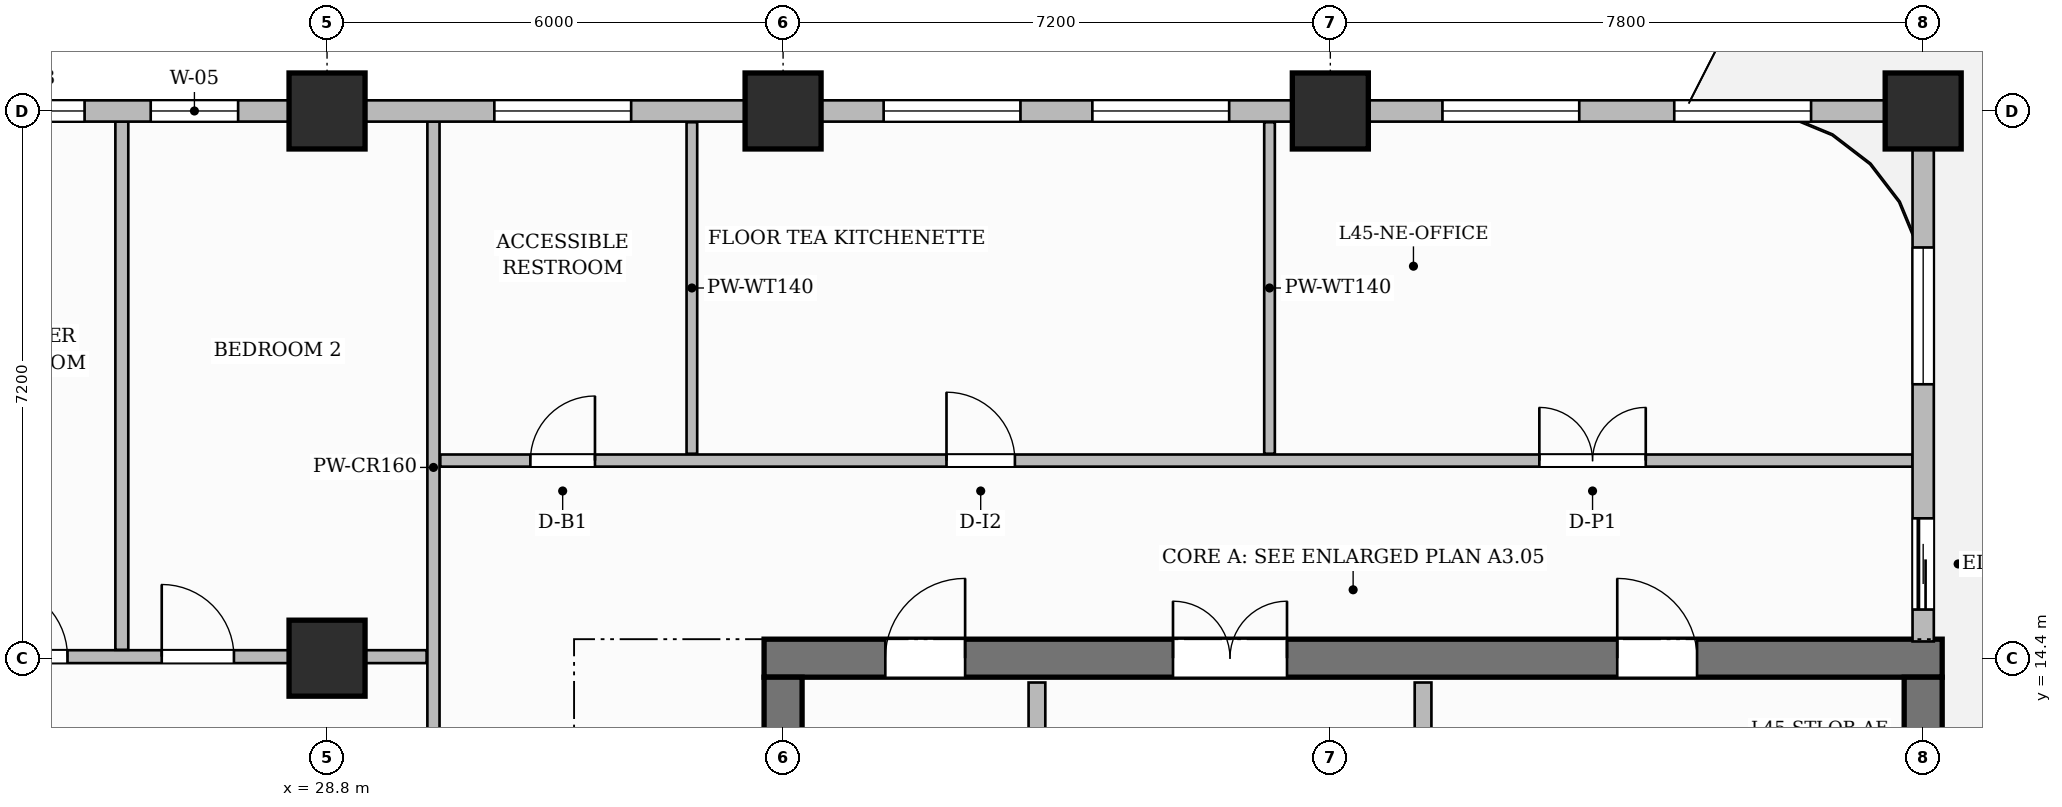
"""IFC4 building model, lengths in metres.
Left out: names, types, materials, properties, quantities, classifications, styles, units other than length and angle.
Written with IfcOpenShell. Run it as: python <this file> out.ifc"""

import sys

from ifc_helpers import new_model, si_unit, direction, frame, frame_2d, origin, origin_2d, place, context, subcontext, project, spatial, rectangle, extrude, source, transform, mapped, element, fill, save


model = new_model("IFC4")
c1 = context("Model", 3, precision=1e-05, world=origin(), true_north=direction((0.0, 1.0)))
c2 = subcontext(c1, "Body", "Model", "MODEL_VIEW")
j1 = project(units=[si_unit("LENGTHUNIT", "METRE"), si_unit("PLANEANGLEUNIT", "RADIAN")], contexts=[c1])
p1 = place(None, origin())
s1 = spatial("IfcSite", under=j1, at=p1, CompositionType="ELEMENT")
p2 = place(p1, origin())
s2 = spatial("IfcBuilding", under=s1, at=p2, CompositionType="ELEMENT")
p3 = place(p2, frame((0.0, 0.0, 181.1)))
s3 = spatial("IfcBuildingStorey", under=s2, at=p3, CompositionType="ELEMENT", Elevation=181.1)
p4 = place(p3, frame((34.55, 14.4, 0.0), z_axis=(0.0, 0.0, 1.0), x_axis=(1.0, 0.0, 0.0)))
e1 = element("IfcWall", 1, at=p4, inside=s3, PredefinedType="SHEAR", context=c2, shape_type="SweptSolid", body=[
    extrude(rectangle(XDim=15.5, YDim=0.5, at=frame_2d((7.75, 0.0))), origin(), (0.0, 0.0, 1.0), 3.85),
])
p5 = place(p4, frame((5.38, 0.0, 0.0)))
e2 = element("IfcOpeningElement", 2, at=p5, cuts=e1, PredefinedType="OPENING", context=c2, shape_type="SweptSolid", body=[
    extrude(rectangle(XDim=1.5, YDim=2.2, at=frame_2d((0.75, 1.1))), frame((0.0, 0.26, 0.0), z_axis=(0.0, -1.0, 0.0), x_axis=(1.0, 0.0, 0.0)), (0.0, 0.0, 1.0), 0.52),
])
p6 = place(p4, frame((1.595, 0.0, 0.0)))
e3 = element("IfcOpeningElement", 3, at=p6, cuts=e1, PredefinedType="OPENING", context=c2, shape_type="SweptSolid", body=[
    extrude(rectangle(XDim=1.05, YDim=2.15, at=frame_2d((0.525, 1.075))), frame((0.0, 0.26, 0.0), z_axis=(0.0, -1.0, 0.0), x_axis=(1.0, 0.0, 0.0)), (0.0, 0.0, 1.0), 0.52),
])
p7 = place(p4, frame((11.225, 0.0, 0.0)))
e4 = element("IfcOpeningElement", 4, at=p7, cuts=e1, PredefinedType="OPENING", context=c2, shape_type="SweptSolid", body=[
    extrude(rectangle(XDim=1.05, YDim=2.15, at=frame_2d((0.525, 1.075))), frame((0.0, 0.26, 0.0), z_axis=(0.0, -1.0, 0.0), x_axis=(1.0, 0.0, 0.0)), (0.0, 0.0, 1.0), 0.52),
])
for number, where, z_axis, x_axis in (
    (5, (34.8, 3.85, 0.0), (0.0, 0.0, 1.0), (0.0, 1.0, 0.0)),
    (6, (49.8, 3.85, 0.0), (0.0, 0.0, 1.0), (0.0, 1.0, 0.0)),
):
    element("IfcWall", number, at=place(p3, frame(where, z_axis=z_axis, x_axis=x_axis)), inside=s3, PredefinedType="SHEAR", context=c2, shape_type="SweptSolid", body=[
        extrude(rectangle(XDim=10.3, YDim=0.5, at=frame_2d((5.15, 0.0))), origin(), (0.0, 0.0, 1.0), 3.85),
    ])
m1 = source(origin(), c2, "Body", "SweptSolid", [
    extrude(rectangle(XDim=1.0, YDim=1.0, at=origin_2d()), origin(), (0.0, 0.0, 1.0), 3.85),
])
for number, where, z_axis, x_axis in (
    (7, (28.8, 14.4, 0.0), (0.0, 0.0, 1.0), (1.0, 0.0, 0.0)),
    (8, (28.8, 21.6, 0.0), (0.0, 0.0, 1.0), (1.0, 0.0, 0.0)),
    (9, (34.8, 21.6, 0.0), (0.0, 0.0, 1.0), (1.0, 0.0, 0.0)),
    (10, (42.0, 21.6, 0.0), (0.0, 0.0, 1.0), (1.0, 0.0, 0.0)),
    (11, (49.8, 21.6, 0.0), (0.0, 0.0, 1.0), (1.0, 0.0, 0.0)),
):
    element("IfcColumn", number, at=place(p3, frame(where, z_axis=z_axis, x_axis=x_axis)), inside=s3, PredefinedType="COLUMN", context=c2, shape_type="MappedRepresentation", body=[
        mapped(m1, transform((0.0, 0.0, 0.0), scale=1.0)),
    ])
p8 = place(p3, frame((38.14, 11.22, 0.0), z_axis=(0.0, 0.0, 1.0), x_axis=(0.0, 1.0, 0.0)))
e12 = element("IfcWall", 12, at=p8, inside=s3, PredefinedType="PARTITIONING", context=c2, shape_type="SweptSolid", body=[
    extrude(rectangle(XDim=2.86, YDim=0.22, at=frame_2d((1.43, 0.0))), origin(), (0.0, 0.0, 1.0), 3.6),
])
p9 = place(p8, frame((0.905, 0.0, 0.0)))
e13 = element("IfcOpeningElement", 13, at=p9, cuts=e12, PredefinedType="OPENING", context=c2, shape_type="SweptSolid", body=[
    extrude(rectangle(XDim=1.05, YDim=2.15, at=frame_2d((0.525, 1.075))), frame((0.0, 0.12, 0.0), z_axis=(0.0, -1.0, 0.0), x_axis=(1.0, 0.0, 0.0)), (0.0, 0.0, 1.0), 0.24),
])
p10 = place(p3, frame((43.22, 11.22, 0.0), z_axis=(0.0, 0.0, 1.0), x_axis=(0.0, 1.0, 0.0)))
e14 = element("IfcWall", 14, at=p10, inside=s3, PredefinedType="PARTITIONING", context=c2, shape_type="SweptSolid", body=[
    extrude(rectangle(XDim=2.86, YDim=0.22, at=frame_2d((1.43, 0.0))), origin(), (0.0, 0.0, 1.0), 3.6),
])
p11 = place(p10, frame((0.905, 0.0, 0.0)))
e15 = element("IfcOpeningElement", 15, at=p11, cuts=e14, PredefinedType="OPENING", context=c2, shape_type="SweptSolid", body=[
    extrude(rectangle(XDim=1.05, YDim=2.15, at=frame_2d((0.525, 1.075))), frame((0.0, 0.12, 0.0), z_axis=(0.0, -1.0, 0.0), x_axis=(1.0, 0.0, 0.0)), (0.0, 0.0, 1.0), 0.24),
])
p12 = place(p3, frame((30.2, 12.36, 0.0), z_axis=(0.0, 0.0, 1.0), x_axis=(0.0, 1.0, 0.0)))
e16 = element("IfcWall", 16, at=p12, inside=s3, PredefinedType="PARTITIONING", context=c2, shape_type="SweptSolid", body=[
    extrude(rectangle(XDim=9.1, YDim=0.16, at=frame_2d((4.55, 0.0))), origin(), (0.0, 0.0, 1.0), 3.6),
])
p13 = place(p3, frame((30.29, 17.0, 0.0), z_axis=(0.0, 0.0, 1.0), x_axis=(1.0, 0.0, 0.0)))
e17 = element("IfcWall", 17, at=p13, inside=s3, PredefinedType="PARTITIONING", context=c2, shape_type="SweptSolid", body=[
    extrude(rectangle(XDim=19.37, YDim=0.16, at=frame_2d((9.685, 0.0))), origin(), (0.0, 0.0, 1.0), 3.6),
])
p14 = place(p13, frame((1.185, 0.0, 0.0)))
e18 = element("IfcOpeningElement", 18, at=p14, cuts=e17, PredefinedType="OPENING", context=c2, shape_type="SweptSolid", body=[
    extrude(rectangle(XDim=0.85, YDim=2.1, at=frame_2d((0.425, 1.05))), frame((0.0, 0.09, 0.0), z_axis=(0.0, -1.0, 0.0), x_axis=(1.0, 0.0, 0.0)), (0.0, 0.0, 1.0), 0.18),
])
p15 = place(p13, frame((6.66, 0.0, 0.0)))
e19 = element("IfcOpeningElement", 19, at=p15, cuts=e17, PredefinedType="OPENING", context=c2, shape_type="SweptSolid", body=[
    extrude(rectangle(XDim=0.9, YDim=2.15, at=frame_2d((0.45, 1.075))), frame((0.0, 0.09, 0.0), z_axis=(0.0, -1.0, 0.0), x_axis=(1.0, 0.0, 0.0)), (0.0, 0.0, 1.0), 0.18),
])
p16 = place(p13, frame((14.46, 0.0, 0.0)))
e20 = element("IfcOpeningElement", 20, at=p16, cuts=e17, PredefinedType="OPENING", context=c2, shape_type="SweptSolid", body=[
    extrude(rectangle(XDim=1.4, YDim=2.35, at=frame_2d((0.7, 1.175))), frame((0.0, 0.09, 0.0), z_axis=(0.0, -1.0, 0.0), x_axis=(1.0, 0.0, 0.0)), (0.0, 0.0, 1.0), 0.18),
])
for number, where, z_axis, x_axis in (
    (21, (33.6, 17.09, 0.0), (0.0, 0.0, 1.0), (0.0, 1.0, 0.0)),
    (22, (41.2, 17.09, 0.0), (0.0, 0.0, 1.0), (0.0, 1.0, 0.0)),
):
    element("IfcWall", number, at=place(p3, frame(where, z_axis=z_axis, x_axis=x_axis)), inside=s3, PredefinedType="PARTITIONING", context=c2, shape_type="SweptSolid", body=[
        extrude(rectangle(XDim=4.362, YDim=0.14, at=frame_2d((2.181, 0.0))), origin(), (0.0, 0.0, 1.0), 3.6),
    ])
p17 = place(p3, frame((23.81, 14.42, 0.0), z_axis=(0.0, 0.0, 1.0), x_axis=(1.0, 0.0, 0.0)))
e23 = element("IfcWall", 23, at=p17, inside=s3, PredefinedType="PARTITIONING", context=c2, shape_type="SweptSolid", body=[
    extrude(rectangle(XDim=6.3, YDim=0.17, at=frame_2d((3.15, 0.0))), origin(), (0.0, 0.0, 1.0), 2.985),
])
p18 = place(p17, frame((0.625, 0.0, 0.0)))
e24 = element("IfcOpeningElement", 24, at=p18, cuts=e23, PredefinedType="OPENING", context=c2, shape_type="SweptSolid", body=[
    extrude(rectangle(XDim=0.95, YDim=2.15, at=frame_2d((0.475, 1.075))), frame((0.0, 0.095, 0.0), z_axis=(0.0, -1.0, 0.0), x_axis=(1.0, 0.0, 0.0)), (0.0, 0.0, 1.0), 0.19),
])
p19 = place(p17, frame((2.815, 0.0, 0.0)))
e25 = element("IfcOpeningElement", 25, at=p19, cuts=e23, PredefinedType="OPENING", context=c2, shape_type="SweptSolid", body=[
    extrude(rectangle(XDim=0.95, YDim=2.15, at=frame_2d((0.475, 1.075))), frame((0.0, 0.095, 0.0), z_axis=(0.0, -1.0, 0.0), x_axis=(1.0, 0.0, 0.0)), (0.0, 0.0, 1.0), 0.19),
])
p20 = place(p3, frame((26.1, 14.51, 0.0), z_axis=(0.0, 0.0, 1.0), x_axis=(0.0, 1.0, 0.0)))
e26 = element("IfcWall", 26, at=p20, inside=s3, PredefinedType="PARTITIONING", context=c2, shape_type="SweptSolid", body=[
    extrude(rectangle(XDim=6.95, YDim=0.17, at=frame_2d((3.475, 0.0))), origin(), (0.0, 0.0, 1.0), 3.6),
])
p21 = place(p3, frame((49.8, 14.62, 0.0), z_axis=(0.0, 0.0, 1.0), x_axis=(0.0, 1.0, 0.0)))
e27 = element("IfcWall", 27, at=p21, inside=s3, PredefinedType="SOLIDWALL", context=c2, shape_type="SweptSolid", body=[
    extrude(rectangle(XDim=6.93, YDim=0.28, at=frame_2d((3.465, 0.0))), origin(), (0.0, 0.0, 1.0), 3.085),
])
p22 = place(p21, frame((0.42, 0.0, 0.0)))
e28 = element("IfcOpeningElement", 28, at=p22, cuts=e27, PredefinedType="OPENING", context=c2, shape_type="SweptSolid", body=[
    extrude(rectangle(XDim=1.2, YDim=2.2, at=frame_2d((0.6, 1.1))), frame((0.0, 0.15, 0.0), z_axis=(0.0, -1.0, 0.0), x_axis=(1.0, 0.0, 0.0)), (0.0, 0.0, 1.0), 0.3),
])
p23 = place(p21, frame((3.384, 0.0, 0.8)))
e29 = element("IfcOpeningElement", 29, at=p23, cuts=e27, PredefinedType="OPENING", context=c2, shape_type="SweptSolid", body=[
    extrude(rectangle(XDim=1.8, YDim=1.85, at=frame_2d((0.9, 0.925))), frame((0.0, 0.15, 0.0), z_axis=(0.0, -1.0, 0.0), x_axis=(1.0, 0.0, 0.0)), (0.0, 0.0, 1.0), 0.3),
])
p24 = place(p3, frame((18.0, 21.6, 0.0), z_axis=(0.0, 0.0, 1.0), x_axis=(1.0, 0.0, 0.0)))
e30 = element("IfcWall", 30, at=p24, inside=s3, PredefinedType="SOLIDWALL", context=c2, shape_type="SweptSolid", body=[
    extrude(rectangle(XDim=31.8, YDim=0.28, at=frame_2d((15.9, 0.0))), origin(), (0.0, 0.0, 1.0), 3.085),
])
p25 = place(p24, frame((0.885, 0.0, 0.8)))
e31 = element("IfcOpeningElement", 31, at=p25, cuts=e30, PredefinedType="OPENING", context=c2, shape_type="SweptSolid", body=[
    extrude(rectangle(XDim=1.4, YDim=1.85, at=frame_2d((0.7, 0.925))), frame((0.0, 0.15, 0.0), z_axis=(0.0, -1.0, 0.0), x_axis=(1.0, 0.0, 0.0)), (0.0, 0.0, 1.0), 0.3),
])
p26 = place(p24, frame((4.581, 0.0, 0.8)))
e32 = element("IfcOpeningElement", 32, at=p26, cuts=e30, PredefinedType="OPENING", context=c2, shape_type="SweptSolid", body=[
    extrude(rectangle(XDim=0.95, YDim=1.75, at=frame_2d((0.475, 0.875))), frame((0.0, 0.15, 0.0), z_axis=(0.0, -1.0, 0.0), x_axis=(1.0, 0.0, 0.0)), (0.0, 0.0, 1.0), 0.3),
])
p27 = place(p24, frame((6.21, 0.0, 0.8)))
e33 = element("IfcOpeningElement", 33, at=p27, cuts=e30, PredefinedType="OPENING", context=c2, shape_type="SweptSolid", body=[
    extrude(rectangle(XDim=1.4, YDim=1.85, at=frame_2d((0.7, 0.925))), frame((0.0, 0.15, 0.0), z_axis=(0.0, -1.0, 0.0), x_axis=(1.0, 0.0, 0.0)), (0.0, 0.0, 1.0), 0.3),
])
p28 = place(p24, frame((8.48, 0.0, 0.8)))
e34 = element("IfcOpeningElement", 34, at=p28, cuts=e30, PredefinedType="OPENING", context=c2, shape_type="SweptSolid", body=[
    extrude(rectangle(XDim=1.15, YDim=1.8, at=frame_2d((0.575, 0.9))), frame((0.0, 0.15, 0.0), z_axis=(0.0, -1.0, 0.0), x_axis=(1.0, 0.0, 0.0)), (0.0, 0.0, 1.0), 0.3),
])
p29 = place(p24, frame((13.001, 0.0, 0.8)))
e35 = element("IfcOpeningElement", 35, at=p29, cuts=e30, PredefinedType="OPENING", context=c2, shape_type="SweptSolid", body=[
    extrude(rectangle(XDim=1.8, YDim=1.85, at=frame_2d((0.9, 0.925))), frame((0.0, 0.15, 0.0), z_axis=(0.0, -1.0, 0.0), x_axis=(1.0, 0.0, 0.0)), (0.0, 0.0, 1.0), 0.3),
])
p30 = place(p24, frame((18.123, 0.0, 0.8)))
e36 = element("IfcOpeningElement", 36, at=p30, cuts=e30, PredefinedType="OPENING", context=c2, shape_type="SweptSolid", body=[
    extrude(rectangle(XDim=1.8, YDim=1.85, at=frame_2d((0.9, 0.925))), frame((0.0, 0.15, 0.0), z_axis=(0.0, -1.0, 0.0), x_axis=(1.0, 0.0, 0.0)), (0.0, 0.0, 1.0), 0.3),
])
p31 = place(p24, frame((20.869, 0.0, 0.8)))
e37 = element("IfcOpeningElement", 37, at=p31, cuts=e30, PredefinedType="OPENING", context=c2, shape_type="SweptSolid", body=[
    extrude(rectangle(XDim=1.8, YDim=1.85, at=frame_2d((0.9, 0.925))), frame((0.0, 0.15, 0.0), z_axis=(0.0, -1.0, 0.0), x_axis=(1.0, 0.0, 0.0)), (0.0, 0.0, 1.0), 0.3),
])
p32 = place(p24, frame((25.475, 0.0, 0.8)))
e38 = element("IfcOpeningElement", 38, at=p32, cuts=e30, PredefinedType="OPENING", context=c2, shape_type="SweptSolid", body=[
    extrude(rectangle(XDim=1.8, YDim=1.85, at=frame_2d((0.9, 0.925))), frame((0.0, 0.15, 0.0), z_axis=(0.0, -1.0, 0.0), x_axis=(1.0, 0.0, 0.0)), (0.0, 0.0, 1.0), 0.3),
])
p33 = place(p24, frame((28.525, 0.0, 0.8)))
e39 = element("IfcOpeningElement", 39, at=p33, cuts=e30, PredefinedType="OPENING", context=c2, shape_type="SweptSolid", body=[
    extrude(rectangle(XDim=1.8, YDim=1.85, at=frame_2d((0.9, 0.925))), frame((0.0, 0.15, 0.0), z_axis=(0.0, -1.0, 0.0), x_axis=(1.0, 0.0, 0.0)), (0.0, 0.0, 1.0), 0.3),
])
m2 = source(origin(), c2, "Body", "SweptSolid", [
    extrude(rectangle(XDim=1.5, YDim=2.2, at=frame_2d((0.75, 1.1))), frame((0.0, 0.025, 0.0), z_axis=(0.0, -1.0, 0.0), x_axis=(1.0, 0.0, 0.0)), (0.0, 0.0, 1.0), 0.05),
])
p34 = place(p5, origin())
e40 = element("IfcDoor", 40, at=p34, inside=s3, OperationType="DOUBLE_DOOR_SINGLE_SWING", PredefinedType="DOOR", context=c2, shape_type="MappedRepresentation", body=[
    mapped(m2, transform((0.0, 0.0, 0.0), scale=1.0)),
])
fill(e2, e40)
m3 = source(origin(), c2, "Body", "SweptSolid", [
    extrude(rectangle(XDim=1.05, YDim=2.15, at=frame_2d((0.525, 1.075))), frame((0.0, 0.025, 0.0), z_axis=(0.0, -1.0, 0.0), x_axis=(1.0, 0.0, 0.0)), (0.0, 0.0, 1.0), 0.05),
])
p35 = place(p6, origin())
e41 = element("IfcDoor", 41, at=p35, inside=s3, OperationType="SINGLE_SWING_RIGHT", PredefinedType="DOOR", context=c2, shape_type="MappedRepresentation", body=[
    mapped(m3, transform((0.0, 0.0, 0.0), scale=1.0)),
])
fill(e3, e41)
p36 = place(p7, origin())
e42 = element("IfcDoor", 42, at=p36, inside=s3, OperationType="SINGLE_SWING_LEFT", PredefinedType="DOOR", context=c2, shape_type="MappedRepresentation", body=[
    mapped(m3, transform((0.0, 0.0, 0.0), scale=1.0)),
])
fill(e4, e42)
m4 = source(origin(), c2, "Body", "SweptSolid", [
    extrude(rectangle(XDim=0.85, YDim=2.1, at=frame_2d((0.425, 1.05))), frame((0.0, 0.025, 0.0), z_axis=(0.0, -1.0, 0.0), x_axis=(1.0, 0.0, 0.0)), (0.0, 0.0, 1.0), 0.05),
])
p37 = place(p14, origin())
e43 = element("IfcDoor", 43, at=p37, inside=s3, OperationType="SINGLE_SWING_RIGHT", PredefinedType="DOOR", context=c2, shape_type="MappedRepresentation", body=[
    mapped(m4, transform((0.0, 0.0, 0.0), scale=1.0)),
])
fill(e18, e43)
m5 = source(origin(), c2, "Body", "SweptSolid", [
    extrude(rectangle(XDim=0.9, YDim=2.15, at=frame_2d((0.45, 1.075))), frame((0.0, 0.025, 0.0), z_axis=(0.0, -1.0, 0.0), x_axis=(1.0, 0.0, 0.0)), (0.0, 0.0, 1.0), 0.05),
])
p38 = place(p15, origin())
e44 = element("IfcDoor", 44, at=p38, inside=s3, OperationType="SINGLE_SWING_LEFT", PredefinedType="DOOR", context=c2, shape_type="MappedRepresentation", body=[
    mapped(m5, transform((0.0, 0.0, 0.0), scale=1.0)),
])
fill(e19, e44)
m6 = source(origin(), c2, "Body", "SweptSolid", [
    extrude(rectangle(XDim=1.4, YDim=2.35, at=frame_2d((0.7, 1.175))), frame((0.0, 0.025, 0.0), z_axis=(0.0, -1.0, 0.0), x_axis=(1.0, 0.0, 0.0)), (0.0, 0.0, 1.0), 0.05),
])
p39 = place(p16, origin())
e45 = element("IfcDoor", 45, at=p39, inside=s3, OperationType="DOUBLE_DOOR_SINGLE_SWING", PredefinedType="DOOR", context=c2, shape_type="MappedRepresentation", body=[
    mapped(m6, transform((0.0, 0.0, 0.0), scale=1.0)),
])
fill(e20, e45)
m7 = source(origin(), c2, "Body", "SweptSolid", [
    extrude(rectangle(XDim=0.95, YDim=2.15, at=frame_2d((0.475, 1.075))), frame((0.0, 0.025, 0.0), z_axis=(0.0, -1.0, 0.0), x_axis=(1.0, 0.0, 0.0)), (0.0, 0.0, 1.0), 0.05),
])
p40 = place(p18, origin())
e46 = element("IfcDoor", 46, at=p40, inside=s3, OperationType="SINGLE_SWING_LEFT", PredefinedType="DOOR", context=c2, shape_type="MappedRepresentation", body=[
    mapped(m7, transform((0.0, 0.0, 0.0), scale=1.0)),
])
fill(e24, e46)
p41 = place(p19, origin())
e47 = element("IfcDoor", 47, at=p41, inside=s3, OperationType="SINGLE_SWING_LEFT", PredefinedType="DOOR", context=c2, shape_type="MappedRepresentation", body=[
    mapped(m7, transform((0.0, 0.0, 0.0), scale=1.0)),
])
fill(e25, e47)
m8 = source(origin(), c2, "Body", "SweptSolid", [
    extrude(rectangle(XDim=1.2, YDim=2.2, at=frame_2d((0.6, 1.1))), frame((0.0, 0.025, 0.0), z_axis=(0.0, -1.0, 0.0), x_axis=(1.0, 0.0, 0.0)), (0.0, 0.0, 1.0), 0.05),
])
p42 = place(p22, origin())
e48 = element("IfcDoor", 48, at=p42, inside=s3, OperationType="SLIDING_TO_LEFT", PredefinedType="DOOR", context=c2, shape_type="MappedRepresentation", body=[
    mapped(m8, transform((0.0, 0.0, 0.0), scale=1.0)),
])
fill(e28, e48)
m9 = source(origin(), c2, "Body", "SweptSolid", [
    extrude(rectangle(XDim=1.8, YDim=1.85, at=frame_2d((0.9, 0.925))), frame((0.0, 0.03, 0.0), z_axis=(0.0, -1.0, 0.0), x_axis=(1.0, 0.0, 0.0)), (0.0, 0.0, 1.0), 0.06),
])
p43 = place(p23, origin())
e49 = element("IfcWindow", 49, at=p43, inside=s3, PartitioningType="DOUBLE_PANEL_VERTICAL", PredefinedType="WINDOW", context=c2, shape_type="MappedRepresentation", body=[
    mapped(m9, transform((0.0, 0.0, 0.0), scale=1.0)),
])
fill(e29, e49)
m10 = source(origin(), c2, "Body", "SweptSolid", [
    extrude(rectangle(XDim=1.4, YDim=1.85, at=frame_2d((0.7, 0.925))), frame((0.0, 0.03, 0.0), z_axis=(0.0, -1.0, 0.0), x_axis=(1.0, 0.0, 0.0)), (0.0, 0.0, 1.0), 0.06),
])
p44 = place(p27, origin())
e50 = element("IfcWindow", 50, at=p44, inside=s3, PartitioningType="SINGLE_PANEL", PredefinedType="WINDOW", context=c2, shape_type="MappedRepresentation", body=[
    mapped(m10, transform((0.0, 0.0, 0.0), scale=1.0)),
])
fill(e33, e50)
m11 = source(origin(), c2, "Body", "SweptSolid", [
    extrude(rectangle(XDim=1.15, YDim=1.8, at=frame_2d((0.575, 0.9))), frame((0.0, 0.03, 0.0), z_axis=(0.0, -1.0, 0.0), x_axis=(1.0, 0.0, 0.0)), (0.0, 0.0, 1.0), 0.06),
])
p45 = place(p28, origin())
e51 = element("IfcWindow", 51, at=p45, inside=s3, PartitioningType="SINGLE_PANEL", PredefinedType="WINDOW", context=c2, shape_type="MappedRepresentation", body=[
    mapped(m11, transform((0.0, 0.0, 0.0), scale=1.0)),
])
fill(e34, e51)
p46 = place(p29, origin())
e52 = element("IfcWindow", 52, at=p46, inside=s3, PartitioningType="DOUBLE_PANEL_VERTICAL", PredefinedType="WINDOW", context=c2, shape_type="MappedRepresentation", body=[
    mapped(m9, transform((0.0, 0.0, 0.0), scale=1.0)),
])
fill(e35, e52)
p47 = place(p30, origin())
e53 = element("IfcWindow", 53, at=p47, inside=s3, PartitioningType="DOUBLE_PANEL_VERTICAL", PredefinedType="WINDOW", context=c2, shape_type="MappedRepresentation", body=[
    mapped(m9, transform((0.0, 0.0, 0.0), scale=1.0)),
])
fill(e36, e53)
p48 = place(p31, origin())
e54 = element("IfcWindow", 54, at=p48, inside=s3, PartitioningType="DOUBLE_PANEL_VERTICAL", PredefinedType="WINDOW", context=c2, shape_type="MappedRepresentation", body=[
    mapped(m9, transform((0.0, 0.0, 0.0), scale=1.0)),
])
fill(e37, e54)
p49 = place(p32, origin())
e55 = element("IfcWindow", 55, at=p49, inside=s3, PartitioningType="DOUBLE_PANEL_VERTICAL", PredefinedType="WINDOW", context=c2, shape_type="MappedRepresentation", body=[
    mapped(m9, transform((0.0, 0.0, 0.0), scale=1.0)),
])
fill(e38, e55)
p50 = place(p33, origin())
e56 = element("IfcWindow", 56, at=p50, inside=s3, PartitioningType="DOUBLE_PANEL_VERTICAL", PredefinedType="WINDOW", context=c2, shape_type="MappedRepresentation", body=[
    mapped(m9, transform((0.0, 0.0, 0.0), scale=1.0)),
])
fill(e39, e56)
save(model, sys.argv[1])
